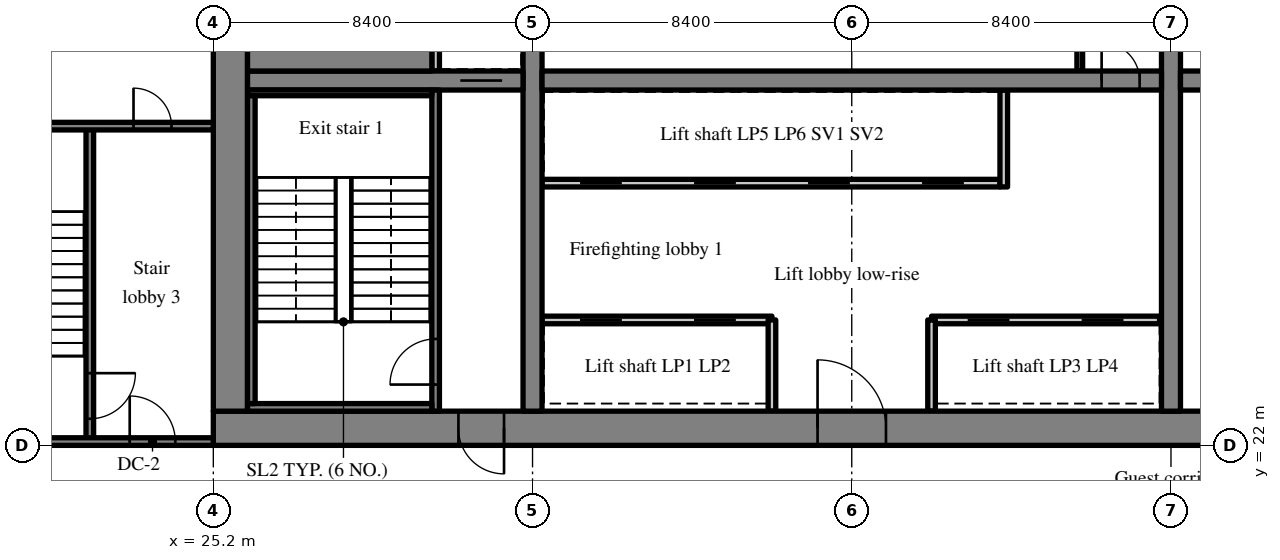
"""IFC4 building model, lengths in metres.
Left out: names, types, materials, properties, quantities, classifications, styles, units other than length and angle.
Written with IfcOpenShell. Run it as: python <this file> out.ifc"""

import sys

from ifc_helpers import new_model, si_unit, direction, frame, frame_2d, origin, place, context, subcontext, project, spatial, rectangle, extrude, source, transform, mapped, element, fill, save


model = new_model("IFC4")
c1 = context("Model", 3, precision=1e-05, world=origin(), true_north=direction((0.0, 1.0)))
c2 = subcontext(c1, "Body", "Model", "MODEL_VIEW")
j1 = project(units=[si_unit("LENGTHUNIT", "METRE"), si_unit("PLANEANGLEUNIT", "RADIAN")], contexts=[c1])
p1 = place(None, origin())
s1 = spatial("IfcSite", under=j1, at=p1, CompositionType="ELEMENT")
p2 = place(p1, origin())
s2 = spatial("IfcBuilding", under=s1, at=p2, CompositionType="ELEMENT")
p3 = place(p2, frame((0.0, 0.0, 121.8)))
s3 = spatial("IfcBuildingStorey", under=s2, at=p3, CompositionType="ELEMENT", Elevation=121.8)
m1 = source(origin(), c2, "Body", "SweptSolid", [
    extrude(rectangle(XDim=50.4, YDim=0.9, at=frame_2d((25.2, 0.0))), origin(), (0.0, 0.0, 1.0), 3.52),
])
p4 = place(p3, frame((25.2, 22.45, 0.0), z_axis=(0.0, 0.0, 1.0), x_axis=(1.0, 0.0, 0.0)))
e1 = element("IfcWall", 1, at=p4, inside=s3, PredefinedType="SHEAR", context=c2, shape_type="MappedRepresentation", body=[
    mapped(m1, transform((0.0, 0.0, 0.0), scale=1.0)),
])
m2 = source(origin(), c2, "Body", "SweptSolid", [
    extrude(rectangle(XDim=1.8, YDim=2.1, at=frame_2d((0.9, 1.05))), frame((0.0, 0.46, 0.0), z_axis=(0.0, -1.0, 0.0), x_axis=(1.0, 0.0, 0.0)), (0.0, 0.0, 1.0), 0.92),
])
p5 = place(p4, frame((15.9, 0.0, 0.0)))
e2 = element("IfcOpeningElement", 2, at=p5, cuts=e1, PredefinedType="OPENING", context=c2, shape_type="MappedRepresentation", body=[
    mapped(m2, transform((0.0, 0.0, 0.0), scale=1.0)),
])
m3 = source(origin(), c2, "Body", "SweptSolid", [
    extrude(rectangle(XDim=1.2, YDim=2.1, at=frame_2d((0.6, 1.05))), frame((0.0, 0.46, 0.0), z_axis=(0.0, -1.0, 0.0), x_axis=(1.0, 0.0, 0.0)), (0.0, 0.0, 1.0), 0.92),
])
p6 = place(p4, frame((26.975, 0.0, 0.0)))
e3 = element("IfcOpeningElement", 3, at=p6, cuts=e1, PredefinedType="OPENING", context=c2, shape_type="MappedRepresentation", body=[
    mapped(m3, transform((0.0, 0.0, 0.0), scale=1.0)),
])
m4 = source(origin(), c2, "Body", "SweptSolid", [
    extrude(rectangle(XDim=0.9, YDim=2.1, at=frame_2d((0.45, 1.05))), frame((0.0, 0.46, 0.0), z_axis=(0.0, -1.0, 0.0), x_axis=(1.0, 0.0, 0.0)), (0.0, 0.0, 1.0), 0.92),
])
p7 = place(p4, frame((33.75, 0.0, 0.0)))
e4 = element("IfcOpeningElement", 4, at=p7, cuts=e1, PredefinedType="OPENING", context=c2, shape_type="MappedRepresentation", body=[
    mapped(m4, transform((0.0, 0.0, 0.0), scale=1.0)),
])
p8 = place(p4, frame((30.75, 0.0, 0.0)))
e5 = element("IfcOpeningElement", 5, at=p8, cuts=e1, PredefinedType="OPENING", context=c2, shape_type="MappedRepresentation", body=[
    mapped(m4, transform((0.0, 0.0, 0.0), scale=1.0)),
])
p9 = place(p4, frame((38.275, 0.0, 0.0)))
e6 = element("IfcOpeningElement", 6, at=p9, cuts=e1, PredefinedType="OPENING", context=c2, shape_type="MappedRepresentation", body=[
    mapped(m4, transform((0.0, 0.0, 0.0), scale=1.0)),
])
p10 = place(p4, frame((6.45, 0.0, 0.0)))
e7 = element("IfcOpeningElement", 7, at=p10, cuts=e1, PredefinedType="OPENING", context=c2, shape_type="MappedRepresentation", body=[
    mapped(m3, transform((0.0, 0.0, 0.0), scale=1.0)),
])
p11 = place(p4, frame((47.775, 0.0, 0.0)))
e8 = element("IfcOpeningElement", 8, at=p11, cuts=e1, PredefinedType="OPENING", context=c2, shape_type="MappedRepresentation", body=[
    mapped(m3, transform((0.0, 0.0, 0.0), scale=1.0)),
])
m5 = source(origin(), c2, "Body", "SweptSolid", [
    extrude(rectangle(XDim=18.2, YDim=0.9, at=frame_2d((9.1, 0.0))), origin(), (0.0, 0.0, 1.0), 3.52),
])
p12 = place(p3, frame((25.65, 22.9, 0.0), z_axis=(0.0, 0.0, 1.0), x_axis=(0.0, 1.0, 0.0)))
e9 = element("IfcWall", 9, at=p12, inside=s3, PredefinedType="SHEAR", context=c2, shape_type="MappedRepresentation", body=[
    mapped(m5, transform((0.0, 0.0, 0.0), scale=1.0)),
])
m6 = source(origin(), c2, "Body", "SweptSolid", [
    extrude(rectangle(XDim=18.2, YDim=0.5, at=frame_2d((9.1, 0.0))), origin(), (0.0, 0.0, 1.0), 3.52),
])
p13 = place(p3, frame((33.6, 22.9, 0.0), z_axis=(0.0, 0.0, 1.0), x_axis=(0.0, 1.0, 0.0)))
e10 = element("IfcWall", 10, at=p13, inside=s3, PredefinedType="SHEAR", context=c2, shape_type="MappedRepresentation", body=[
    mapped(m6, transform((0.0, 0.0, 0.0), scale=1.0)),
])
m7 = source(origin(), c2, "Body", "SweptSolid", [
    extrude(rectangle(XDim=1.1, YDim=2.1, at=frame_2d((0.55, 1.05))), frame((0.0, 0.26, 0.0), z_axis=(0.0, -1.0, 0.0), x_axis=(1.0, 0.0, 0.0)), (0.0, 0.0, 1.0), 0.52),
])
p14 = place(p13, frame((12.55, 0.0, 0.0)))
e11 = element("IfcOpeningElement", 11, at=p14, cuts=e10, PredefinedType="OPENING", context=c2, shape_type="MappedRepresentation", body=[
    mapped(m7, transform((0.0, 0.0, 0.0), scale=1.0)),
])
p15 = place(p3, frame((50.4, 22.9, 0.0), z_axis=(0.0, 0.0, 1.0), x_axis=(0.0, 1.0, 0.0)))
e12 = element("IfcWall", 12, at=p15, inside=s3, PredefinedType="SHEAR", context=c2, shape_type="MappedRepresentation", body=[
    mapped(m6, transform((0.0, 0.0, 0.0), scale=1.0)),
])
p16 = place(p15, frame((12.55, 0.0, 0.0)))
e13 = element("IfcOpeningElement", 13, at=p16, cuts=e12, PredefinedType="OPENING", context=c2, shape_type="MappedRepresentation", body=[
    mapped(m7, transform((0.0, 0.0, 0.0), scale=1.0)),
])
m8 = source(origin(), c2, "Body", "SweptSolid", [
    extrude(rectangle(XDim=7.25, YDim=0.5, at=frame_2d((3.625, 0.0))), origin(), (0.0, 0.0, 1.0), 3.52),
])
p17 = place(p3, frame((26.1, 31.6, 0.0), z_axis=(0.0, 0.0, 1.0), x_axis=(1.0, 0.0, 0.0)))
e14 = element("IfcWall", 14, at=p17, inside=s3, PredefinedType="SHEAR", context=c2, shape_type="MappedRepresentation", body=[
    mapped(m8, transform((0.0, 0.0, 0.0), scale=1.0)),
])
p18 = place(p17, frame((5.6, 0.0, 0.0)))
e15 = element("IfcOpeningElement", 15, at=p18, cuts=e14, PredefinedType="OPENING", context=c2, shape_type="MappedRepresentation", body=[
    mapped(m7, transform((0.0, 0.0, 0.0), scale=1.0)),
])
m9 = source(origin(), c2, "Body", "SweptSolid", [
    extrude(rectangle(XDim=16.3, YDim=0.5, at=frame_2d((8.15, 0.0))), origin(), (0.0, 0.0, 1.0), 3.52),
])
p19 = place(p3, frame((33.85, 31.6, 0.0), z_axis=(0.0, 0.0, 1.0), x_axis=(1.0, 0.0, 0.0)))
e16 = element("IfcWall", 16, at=p19, inside=s3, PredefinedType="SHEAR", context=c2, shape_type="MappedRepresentation", body=[
    mapped(m9, transform((0.0, 0.0, 0.0), scale=1.0)),
])
m10 = source(origin(), c2, "Body", "SweptSolid", [
    extrude(rectangle(XDim=1.0, YDim=2.1, at=frame_2d((0.5, 1.05))), frame((0.0, 0.26, 0.0), z_axis=(0.0, -1.0, 0.0), x_axis=(1.0, 0.0, 0.0)), (0.0, 0.0, 1.0), 0.52),
])
p20 = place(p19, frame((14.725, 0.0, 0.0)))
e17 = element("IfcOpeningElement", 17, at=p20, cuts=e16, PredefinedType="OPENING", context=c2, shape_type="MappedRepresentation", body=[
    mapped(m10, transform((0.0, 0.0, 0.0), scale=1.0)),
])
m11 = source(origin(), c2, "Body", "SweptSolid", [
    extrude(rectangle(XDim=16.3, YDim=0.5, at=frame_2d((8.15, 0.0))), origin(), (0.0, 0.0, 1.0), 3.52),
])
p21 = place(p3, frame((50.65, 31.6, 0.0), z_axis=(0.0, 0.0, 1.0), x_axis=(1.0, 0.0, 0.0)))
e18 = element("IfcWall", 18, at=p21, inside=s3, PredefinedType="SHEAR", context=c2, shape_type="MappedRepresentation", body=[
    mapped(m11, transform((0.0, 0.0, 0.0), scale=1.0)),
])
p22 = place(p21, frame((0.575, 0.0, 0.0)))
e19 = element("IfcOpeningElement", 19, at=p22, cuts=e18, PredefinedType="OPENING", context=c2, shape_type="MappedRepresentation", body=[
    mapped(m10, transform((0.0, 0.0, 0.0), scale=1.0)),
])
m12 = source(origin(), c2, "Body", "SweptSolid", [
    extrude(rectangle(XDim=6.05, YDim=0.2, at=frame_2d((3.025, 0.0))), origin(), (0.0, 0.0, 1.0), 3.52),
])
p23 = place(p3, frame((33.85, 25.3, 0.0), z_axis=(0.0, 0.0, 1.0), x_axis=(1.0, 0.0, 0.0)))
e20 = element("IfcWall", 20, at=p23, inside=s3, PredefinedType="SOLIDWALL", context=c2, shape_type="MappedRepresentation", body=[
    mapped(m12, transform((0.0, 0.0, 0.0), scale=1.0)),
])
m13 = source(origin(), c2, "Body", "SweptSolid", [
    extrude(rectangle(XDim=1.1, YDim=2.1, at=frame_2d((0.55, 1.05))), frame((0.0, 0.11, 0.0), z_axis=(0.0, -1.0, 0.0), x_axis=(1.0, 0.0, 0.0)), (0.0, 0.0, 1.0), 0.22),
])
p24 = place(p23, frame((1.0, 0.0, 0.0)))
e21 = element("IfcOpeningElement", 21, at=p24, cuts=e20, PredefinedType="OPENING", context=c2, shape_type="MappedRepresentation", body=[
    mapped(m13, transform((0.0, 0.0, 0.0), scale=1.0)),
])
p25 = place(p23, frame((4.0, 0.0, 0.0)))
e22 = element("IfcOpeningElement", 22, at=p25, cuts=e20, PredefinedType="OPENING", context=c2, shape_type="MappedRepresentation", body=[
    mapped(m13, transform((0.0, 0.0, 0.0), scale=1.0)),
])
m14 = source(origin(), c2, "Body", "SweptSolid", [
    extrude(rectangle(XDim=6.0, YDim=0.2, at=frame_2d((3.0, 0.0))), origin(), (0.0, 0.0, 1.0), 3.52),
])
p26 = place(p3, frame((44.1, 25.3, 0.0), z_axis=(0.0, 0.0, 1.0), x_axis=(1.0, 0.0, 0.0)))
e23 = element("IfcWall", 23, at=p26, inside=s3, PredefinedType="SOLIDWALL", context=c2, shape_type="MappedRepresentation", body=[
    mapped(m14, transform((0.0, 0.0, 0.0), scale=1.0)),
])
p27 = place(p26, frame((0.95, 0.0, 0.0)))
e24 = element("IfcOpeningElement", 24, at=p27, cuts=e23, PredefinedType="OPENING", context=c2, shape_type="MappedRepresentation", body=[
    mapped(m13, transform((0.0, 0.0, 0.0), scale=1.0)),
])
p28 = place(p26, frame((3.95, 0.0, 0.0)))
e25 = element("IfcOpeningElement", 25, at=p28, cuts=e23, PredefinedType="OPENING", context=c2, shape_type="MappedRepresentation", body=[
    mapped(m13, transform((0.0, 0.0, 0.0), scale=1.0)),
])
m15 = source(origin(), c2, "Body", "SweptSolid", [
    extrude(rectangle(XDim=12.05, YDim=0.2, at=frame_2d((6.025, 0.0))), origin(), (0.0, 0.0, 1.0), 3.52),
])
p29 = place(p3, frame((33.85, 28.9, 0.0), z_axis=(0.0, 0.0, 1.0), x_axis=(1.0, 0.0, 0.0)))
e26 = element("IfcWall", 26, at=p29, inside=s3, PredefinedType="SOLIDWALL", context=c2, shape_type="MappedRepresentation", body=[
    mapped(m15, transform((0.0, 0.0, 0.0), scale=1.0)),
])
p30 = place(p29, frame((1.0, 0.0, 0.0)))
e27 = element("IfcOpeningElement", 27, at=p30, cuts=e26, PredefinedType="OPENING", context=c2, shape_type="MappedRepresentation", body=[
    mapped(m13, transform((0.0, 0.0, 0.0), scale=1.0)),
])
p31 = place(p29, frame((4.0, 0.0, 0.0)))
e28 = element("IfcOpeningElement", 28, at=p31, cuts=e26, PredefinedType="OPENING", context=c2, shape_type="MappedRepresentation", body=[
    mapped(m13, transform((0.0, 0.0, 0.0), scale=1.0)),
])
p32 = place(p29, frame((7.0, 0.0, 0.0)))
e29 = element("IfcOpeningElement", 29, at=p32, cuts=e26, PredefinedType="OPENING", context=c2, shape_type="MappedRepresentation", body=[
    mapped(m13, transform((0.0, 0.0, 0.0), scale=1.0)),
])
p33 = place(p29, frame((10.0, 0.0, 0.0)))
e30 = element("IfcOpeningElement", 30, at=p33, cuts=e26, PredefinedType="OPENING", context=c2, shape_type="MappedRepresentation", body=[
    mapped(m13, transform((0.0, 0.0, 0.0), scale=1.0)),
])
m16 = source(origin(), c2, "Body", "SweptSolid", [
    extrude(rectangle(XDim=2.4, YDim=0.2, at=frame_2d((1.2, 0.0))), origin(), (0.0, 0.0, 1.0), 3.52),
])
for number, where, z_axis, x_axis in (
    (31, (39.9, 22.9, 0.0), (0.0, 0.0, 1.0), (0.0, 1.0, 0.0)),
    (32, (44.1, 22.9, 0.0), (0.0, 0.0, 1.0), (0.0, 1.0, 0.0)),
):
    element("IfcWall", number, at=place(p3, frame(where, z_axis=z_axis, x_axis=x_axis)), inside=s3, PredefinedType="SOLIDWALL", context=c2, shape_type="MappedRepresentation", body=[
        mapped(m16, transform((0.0, 0.0, 0.0), scale=1.0)),
    ])
m17 = source(origin(), c2, "Body", "SweptSolid", [
    extrude(rectangle(XDim=2.55, YDim=0.2, at=frame_2d((1.275, 0.0))), origin(), (0.0, 0.0, 1.0), 3.52),
])
p34 = place(p3, frame((46.0, 28.8, 0.0), z_axis=(0.0, 0.0, 1.0), x_axis=(0.0, 1.0, 0.0)))
e33 = element("IfcWall", 33, at=p34, inside=s3, PredefinedType="SOLIDWALL", context=c2, shape_type="MappedRepresentation", body=[
    mapped(m17, transform((0.0, 0.0, 0.0), scale=1.0)),
])
m18 = source(origin(), c2, "Body", "SweptSolid", [
    extrude(rectangle(XDim=3.15, YDim=0.15, at=frame_2d((1.575, 0.0))), origin(), (0.0, 0.0, 1.0), 3.52),
])
p35 = place(p3, frame((48.0, 31.85, 0.0), z_axis=(0.0, 0.0, 1.0), x_axis=(0.0, 1.0, 0.0)))
e34 = element("IfcWall", 34, at=p35, inside=s3, PredefinedType="PARTITIONING", context=c2, shape_type="MappedRepresentation", body=[
    mapped(m18, transform((0.0, 0.0, 0.0), scale=1.0)),
])
m19 = source(origin(), c2, "Body", "SweptSolid", [
    extrude(rectangle(XDim=8.45, YDim=0.2, at=frame_2d((4.225, 0.0))), origin(), (0.0, 0.0, 1.0), 3.52),
])
p36 = place(p3, frame((31.05, 22.9, 0.0), z_axis=(0.0, 0.0, 1.0), x_axis=(0.0, 1.0, 0.0)))
e35 = element("IfcWall", 35, at=p36, inside=s3, PredefinedType="SOLIDWALL", context=c2, shape_type="MappedRepresentation", body=[
    mapped(m19, transform((0.0, 0.0, 0.0), scale=1.0)),
])
m20 = source(origin(), c2, "Body", "SweptSolid", [
    extrude(rectangle(XDim=1.2, YDim=2.1, at=frame_2d((0.6, 1.05))), frame((0.0, 0.11, 0.0), z_axis=(0.0, -1.0, 0.0), x_axis=(1.0, 0.0, 0.0)), (0.0, 0.0, 1.0), 0.22),
])
p37 = place(p36, frame((0.7, 0.0, 0.0)))
e36 = element("IfcOpeningElement", 36, at=p37, cuts=e35, PredefinedType="OPENING", context=c2, shape_type="MappedRepresentation", body=[
    mapped(m20, transform((0.0, 0.0, 0.0), scale=1.0)),
])
m21 = source(origin(), c2, "Body", "SweptSolid", [
    extrude(rectangle(XDim=1.75, YDim=0.2, at=frame_2d((0.875, 0.0))), origin(), (0.0, 0.0, 1.0), 3.52),
])
p38 = place(p3, frame((31.05, 31.85, 0.0), z_axis=(0.0, 0.0, 1.0), x_axis=(0.0, 1.0, 0.0)))
e37 = element("IfcWall", 37, at=p38, inside=s3, PredefinedType="SOLIDWALL", context=c2, shape_type="MappedRepresentation", body=[
    mapped(m21, transform((0.0, 0.0, 0.0), scale=1.0)),
])
m22 = source(origin(), c2, "Body", "SweptSolid", [
    extrude(rectangle(XDim=8.3, YDim=0.2, at=frame_2d((4.15, 0.0))), origin(), (0.0, 0.0, 1.0), 3.52),
])
p39 = place(p3, frame((21.95, 22.1, 0.0), z_axis=(0.0, 0.0, 1.0), x_axis=(0.0, 1.0, 0.0)))
e38 = element("IfcWall", 38, at=p39, inside=s3, PredefinedType="SOLIDWALL", context=c2, shape_type="MappedRepresentation", body=[
    mapped(m22, transform((0.0, 0.0, 0.0), scale=1.0)),
])
p40 = place(p39, frame((0.6, 0.0, 0.0)))
e39 = element("IfcOpeningElement", 39, at=p40, cuts=e38, PredefinedType="OPENING", context=c2, shape_type="MappedRepresentation", body=[
    mapped(m20, transform((0.0, 0.0, 0.0), scale=1.0)),
])
m23 = source(origin(), c2, "Body", "SweptSolid", [
    extrude(rectangle(XDim=8.225, YDim=0.2, at=frame_2d((4.112, 0.0))), origin(), (0.0, 0.0, 1.0), 3.52),
])
p41 = place(p3, frame((16.975, 22.1, 0.0), z_axis=(0.0, 0.0, 1.0), x_axis=(1.0, 0.0, 0.0)))
e40 = element("IfcWall", 40, at=p41, inside=s3, PredefinedType="SOLIDWALL", context=c2, shape_type="MappedRepresentation", body=[
    mapped(m23, transform((0.0, 0.0, 0.0), scale=1.0)),
])
p42 = place(p41, frame((6.025, 0.0, 0.0)))
e41 = element("IfcOpeningElement", 41, at=p42, cuts=e40, PredefinedType="OPENING", context=c2, shape_type="MappedRepresentation", body=[
    mapped(m20, transform((0.0, 0.0, 0.0), scale=1.0)),
])
p43 = place(p3, frame((16.975, 30.4, 0.0), z_axis=(0.0, 0.0, 1.0), x_axis=(1.0, 0.0, 0.0)))
e42 = element("IfcWall", 42, at=p43, inside=s3, PredefinedType="SOLIDWALL", context=c2, shape_type="MappedRepresentation", body=[
    mapped(m23, transform((0.0, 0.0, 0.0), scale=1.0)),
])
m24 = source(origin(), c2, "Body", "SweptSolid", [
    extrude(rectangle(XDim=1.0, YDim=2.1, at=frame_2d((0.5, 1.05))), frame((0.0, 0.11, 0.0), z_axis=(0.0, -1.0, 0.0), x_axis=(1.0, 0.0, 0.0)), (0.0, 0.0, 1.0), 0.22),
])
p44 = place(p43, frame((6.125, 0.0, 0.0)))
e43 = element("IfcOpeningElement", 43, at=p44, cuts=e42, PredefinedType="OPENING", context=c2, shape_type="MappedRepresentation", body=[
    mapped(m24, transform((0.0, 0.0, 0.0), scale=1.0)),
])
m25 = source(origin(), c2, "Body", "SweptSolid", [
    extrude(rectangle(XDim=4.85, YDim=0.2, at=frame_2d((2.425, 0.0))), origin(), (0.0, 0.0, 1.0), 3.52),
])
p45 = place(p3, frame((26.1, 23.0, 0.0), z_axis=(0.0, 0.0, 1.0), x_axis=(1.0, 0.0, 0.0)))
e44 = element("IfcWall", 44, at=p45, inside=s3, PredefinedType="SOLIDWALL", context=c2, shape_type="MappedRepresentation", body=[
    mapped(m25, transform((0.0, 0.0, 0.0), scale=1.0)),
])
m26 = source(origin(), c2, "Body", "SweptSolid", [
    extrude(rectangle(XDim=4.85, YDim=0.15, at=frame_2d((2.425, 0.0))), origin(), (0.0, 0.0, 1.0), 3.52),
])
p46 = place(p3, frame((26.1, 31.275, 0.0), z_axis=(0.0, 0.0, 1.0), x_axis=(1.0, 0.0, 0.0)))
e45 = element("IfcWall", 45, at=p46, inside=s3, PredefinedType="SOLIDWALL", context=c2, shape_type="MappedRepresentation", body=[
    mapped(m26, transform((0.0, 0.0, 0.0), scale=1.0)),
])
m27 = source(origin(), c2, "Body", "SweptSolid", [
    extrude(rectangle(XDim=8.1, YDim=0.2, at=frame_2d((4.05, 0.0))), origin(), (0.0, 0.0, 1.0), 3.52),
])
p47 = place(p3, frame((26.2, 23.1, 0.0), z_axis=(0.0, 0.0, 1.0), x_axis=(0.0, 1.0, 0.0)))
e46 = element("IfcWall", 46, at=p47, inside=s3, PredefinedType="SOLIDWALL", context=c2, shape_type="MappedRepresentation", body=[
    mapped(m27, transform((0.0, 0.0, 0.0), scale=1.0)),
])
m28 = source(origin(), c2, "Body", "SweptSolid", [
    extrude(rectangle(XDim=4.85, YDim=0.95, at=frame_2d((2.425, 0.0))), origin(), (0.0, 0.0, 1.0), 3.52),
])
p48 = place(p3, frame((26.1, 32.325, 0.0), z_axis=(0.0, 0.0, 1.0), x_axis=(1.0, 0.0, 0.0)))
e47 = element("IfcWall", 47, at=p48, inside=s3, PredefinedType="SOLIDWALL", context=c2, shape_type="MappedRepresentation", body=[
    mapped(m28, transform((0.0, 0.0, 0.0), scale=1.0)),
])
m29 = source(origin(), c2, "Body", "SweptSolid", [
    extrude(rectangle(XDim=1.8, YDim=2.1, at=frame_2d((0.9, 1.05))), frame((0.0, 0.375, 0.0), z_axis=(0.0, -1.0, 0.0), x_axis=(1.0, 0.0, 0.0)), (0.0, 0.0, 1.0), 0.05),
])
p49 = place(p5, origin())
e48 = element("IfcDoor", 48, at=p49, inside=s3, OperationType="DOUBLE_DOOR_SINGLE_SWING", PredefinedType="DOOR", context=c2, shape_type="MappedRepresentation", body=[
    mapped(m29, transform((0.0, 0.0, 0.0), scale=1.0)),
])
fill(e2, e48)
m30 = source(origin(), c2, "Body", "SweptSolid", [
    extrude(rectangle(XDim=1.0, YDim=2.1, at=frame_2d((0.5, 1.05))), frame((0.0, 0.025, 0.0), z_axis=(0.0, -1.0, 0.0), x_axis=(1.0, 0.0, 0.0)), (0.0, 0.0, 1.0), 0.05),
])
p50 = place(p20, origin())
e49 = element("IfcDoor", 49, at=p50, inside=s3, OperationType="SINGLE_SWING_LEFT", PredefinedType="DOOR", context=c2, shape_type="MappedRepresentation", body=[
    mapped(m30, transform((0.0, 0.0, 0.0), scale=1.0)),
])
fill(e17, e49)
m31 = source(origin(), c2, "Body", "SweptSolid", [
    extrude(rectangle(XDim=1.1, YDim=2.1, at=frame_2d((0.55, 1.05))), frame((0.0, 0.025, 0.0), z_axis=(0.0, -1.0, 0.0), x_axis=(1.0, 0.0, 0.0)), (0.0, 0.0, 1.0), 0.05),
])
p51 = place(p24, origin())
e50 = element("IfcDoor", 50, at=p51, inside=s3, OperationType="SLIDING_TO_LEFT", PredefinedType="DOOR", context=c2, shape_type="MappedRepresentation", body=[
    mapped(m31, transform((0.0, 0.0, 0.0), scale=1.0)),
])
fill(e21, e50)
p52 = place(p25, origin())
e51 = element("IfcDoor", 51, at=p52, inside=s3, OperationType="SLIDING_TO_RIGHT", PredefinedType="DOOR", context=c2, shape_type="MappedRepresentation", body=[
    mapped(m31, transform((0.0, 0.0, 0.0), scale=1.0)),
])
fill(e22, e51)
p53 = place(p27, origin())
e52 = element("IfcDoor", 52, at=p53, inside=s3, OperationType="SLIDING_TO_LEFT", PredefinedType="DOOR", context=c2, shape_type="MappedRepresentation", body=[
    mapped(m31, transform((0.0, 0.0, 0.0), scale=1.0)),
])
fill(e24, e52)
p54 = place(p28, origin())
e53 = element("IfcDoor", 53, at=p54, inside=s3, OperationType="SLIDING_TO_RIGHT", PredefinedType="DOOR", context=c2, shape_type="MappedRepresentation", body=[
    mapped(m31, transform((0.0, 0.0, 0.0), scale=1.0)),
])
fill(e25, e53)
p55 = place(p30, origin())
e54 = element("IfcDoor", 54, at=p55, inside=s3, OperationType="SLIDING_TO_LEFT", PredefinedType="DOOR", context=c2, shape_type="MappedRepresentation", body=[
    mapped(m31, transform((0.0, 0.0, 0.0), scale=1.0)),
])
fill(e27, e54)
p56 = place(p31, origin())
e55 = element("IfcDoor", 55, at=p56, inside=s3, OperationType="SLIDING_TO_RIGHT", PredefinedType="DOOR", context=c2, shape_type="MappedRepresentation", body=[
    mapped(m31, transform((0.0, 0.0, 0.0), scale=1.0)),
])
fill(e28, e55)
p57 = place(p32, origin())
e56 = element("IfcDoor", 56, at=p57, inside=s3, OperationType="SLIDING_TO_LEFT", PredefinedType="DOOR", context=c2, shape_type="MappedRepresentation", body=[
    mapped(m31, transform((0.0, 0.0, 0.0), scale=1.0)),
])
fill(e29, e56)
p58 = place(p33, origin())
e57 = element("IfcDoor", 57, at=p58, inside=s3, OperationType="SLIDING_TO_RIGHT", PredefinedType="DOOR", context=c2, shape_type="MappedRepresentation", body=[
    mapped(m31, transform((0.0, 0.0, 0.0), scale=1.0)),
])
fill(e30, e57)
m32 = source(origin(), c2, "Body", "SweptSolid", [
    extrude(rectangle(XDim=1.2, YDim=2.1, at=frame_2d((0.6, 1.05))), frame((0.0, 0.025, 0.0), z_axis=(0.0, -1.0, 0.0), x_axis=(1.0, 0.0, 0.0)), (0.0, 0.0, 1.0), 0.05),
])
p59 = place(p37, origin())
e58 = element("IfcDoor", 58, at=p59, inside=s3, OperationType="SINGLE_SWING_LEFT", PredefinedType="DOOR", context=c2, shape_type="MappedRepresentation", body=[
    mapped(m32, transform((0.0, 0.0, 0.0), scale=1.0)),
])
fill(e36, e58)
m33 = source(origin(), c2, "Body", "SweptSolid", [
    extrude(rectangle(XDim=1.2, YDim=2.1, at=frame_2d((0.6, 1.05))), frame((0.0, 0.375, 0.0), z_axis=(0.0, -1.0, 0.0), x_axis=(1.0, 0.0, 0.0)), (0.0, 0.0, 1.0), 0.05),
])
p60 = place(p10, origin())
e59 = element("IfcDoor", 59, at=p60, inside=s3, OperationType="SINGLE_SWING_RIGHT", PredefinedType="DOOR", context=c2, shape_type="MappedRepresentation", body=[
    mapped(m33, transform((0.0, 0.0, 0.0), scale=1.0)),
])
fill(e7, e59)
p61 = place(p18, origin())
e60 = element("IfcDoor", 60, at=p61, inside=s3, OperationType="SLIDING_TO_LEFT", PredefinedType="DOOR", context=c2, shape_type="MappedRepresentation", body=[
    mapped(m31, transform((0.0, 0.0, 0.0), scale=1.0)),
])
fill(e15, e60)
p62 = place(p40, origin())
e61 = element("IfcDoor", 61, at=p62, inside=s3, OperationType="SINGLE_SWING_RIGHT", PredefinedType="DOOR", context=c2, shape_type="MappedRepresentation", body=[
    mapped(m32, transform((0.0, 0.0, 0.0), scale=1.0)),
])
fill(e39, e61)
p63 = place(p42, origin())
e62 = element("IfcDoor", 62, at=p63, inside=s3, OperationType="SINGLE_SWING_LEFT", PredefinedType="DOOR", context=c2, shape_type="MappedRepresentation", body=[
    mapped(m32, transform((0.0, 0.0, 0.0), scale=1.0)),
])
fill(e41, e62)
p64 = place(p44, origin())
e63 = element("IfcDoor", 63, at=p64, inside=s3, OperationType="SINGLE_SWING_LEFT", PredefinedType="DOOR", context=c2, shape_type="MappedRepresentation", body=[
    mapped(m30, transform((0.0, 0.0, 0.0), scale=1.0)),
])
fill(e43, e63)
save(model, sys.argv[1])
